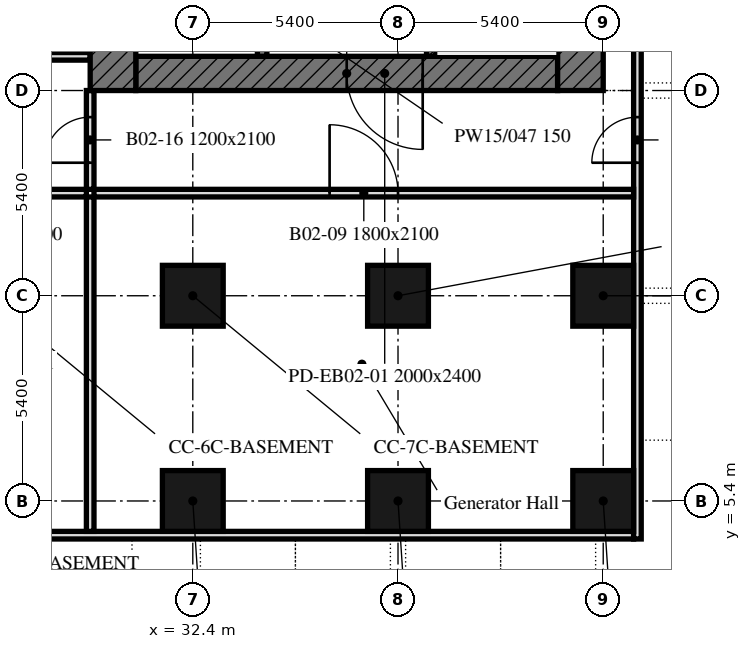
"""IFC4 building model, lengths in metres.
Left out: names, types, materials, properties, quantities, classifications, styles, units other than length and angle.
Written with IfcOpenShell. Run it as: python <this file> out.ifc"""

import sys

from ifc_helpers import new_model, si_unit, direction, frame, frame_2d, origin, origin_2d, place, context, subcontext, project, spatial, rectangle, extrude, element, fill, save


model = new_model("IFC4")
c1 = context("Model", 3, precision=1e-05, world=origin(), true_north=direction((0.0, 1.0)))
c2 = subcontext(c1, "Body", "Model", "MODEL_VIEW")
j1 = project(units=[si_unit("LENGTHUNIT", "METRE"), si_unit("PLANEANGLEUNIT", "RADIAN")], contexts=[c1])
p1 = place(None, origin())
s1 = spatial("IfcSite", under=j1, at=p1, CompositionType="ELEMENT")
p2 = place(p1, origin())
s2 = spatial("IfcBuilding", under=s1, at=p2, CompositionType="ELEMENT")
p3 = place(p2, frame((0.0, 0.0, -9.0)))
s3 = spatial("IfcBuildingStorey", under=s2, at=p3, CompositionType="ELEMENT", Elevation=-9.0)
for number, where, z_axis, x_axis in (
    (1, (32.4, 5.4, 0.0), (0.0, 0.0, 1.0), (1.0, 0.0, 0.0)),
    (2, (37.8, 5.4, 0.0), (0.0, 0.0, 1.0), (1.0, 0.0, 0.0)),
    (3, (43.2, 5.4, 0.0), (0.0, 0.0, 1.0), (1.0, 0.0, 0.0)),
    (4, (32.4, 10.8, 0.0), (0.0, 0.0, 1.0), (1.0, 0.0, 0.0)),
    (5, (37.8, 10.8, 0.0), (0.0, 0.0, 1.0), (1.0, 0.0, 0.0)),
    (6, (43.2, 10.8, 0.0), (0.0, 0.0, 1.0), (1.0, 0.0, 0.0)),
):
    element("IfcColumn", number, at=place(p3, frame(where, z_axis=z_axis, x_axis=x_axis)), inside=s3, PredefinedType="COLUMN", context=c2, shape_type="SweptSolid", body=[
        extrude(rectangle(XDim=1.6, YDim=1.6, at=origin_2d()), origin(), (0.0, 0.0, 1.0), 4.1),
    ])
p4 = place(p3, frame((4.6, 4.5, 0.0), z_axis=(0.0, 0.0, 1.0), x_axis=(1.0, 0.0, 0.0)))
e7 = element("IfcWall", 7, at=p4, inside=s3, PredefinedType="PARTITIONING", context=c2, shape_type="SweptSolid", body=[
    extrude(rectangle(XDim=39.4, YDim=0.2, at=frame_2d((19.7, 0.0))), origin(), (0.0, 0.0, 1.0), 4.1),
])
p5 = place(p4, frame((18.3, 0.0, 0.0)))
e8 = element("IfcOpeningElement", 8, at=p5, cuts=e7, PredefinedType="OPENING", context=c2, shape_type="SweptSolid", body=[
    extrude(rectangle(XDim=1.2, YDim=2.1, at=frame_2d((0.6, 1.05))), frame((0.0, 0.11, 0.0), z_axis=(0.0, -1.0, 0.0), x_axis=(1.0, 0.0, 0.0)), (0.0, 0.0, 1.0), 0.22),
])
p6 = place(p3, frame((44.1, 4.4, 0.0), z_axis=(0.0, 0.0, 1.0), x_axis=(0.0, 1.0, 0.0)))
e9 = element("IfcWall", 9, at=p6, inside=s3, PredefinedType="PARTITIONING", context=c2, shape_type="SweptSolid", body=[
    extrude(rectangle(XDim=39.8, YDim=0.2, at=frame_2d((19.9, 0.0))), origin(), (0.0, 0.0, 1.0), 4.1),
])
p7 = place(p6, frame((9.9, 0.0, 0.0)))
e10 = element("IfcOpeningElement", 10, at=p7, cuts=e9, PredefinedType="OPENING", context=c2, shape_type="SweptSolid", body=[
    extrude(rectangle(XDim=1.2, YDim=2.1, at=frame_2d((0.6, 1.05))), frame((0.0, 0.11, 0.0), z_axis=(0.0, -1.0, 0.0), x_axis=(1.0, 0.0, 0.0)), (0.0, 0.0, 1.0), 0.22),
])
p8 = place(p6, frame((28.7, 0.0, 0.0)))
e11 = element("IfcOpeningElement", 11, at=p8, cuts=e9, PredefinedType="OPENING", context=c2, shape_type="SweptSolid", body=[
    extrude(rectangle(XDim=1.2, YDim=2.1, at=frame_2d((0.6, 1.05))), frame((0.0, 0.11, 0.0), z_axis=(0.0, -1.0, 0.0), x_axis=(1.0, 0.0, 0.0)), (0.0, 0.0, 1.0), 0.22),
])
p9 = place(p3, frame((29.7, 4.6, 0.0), z_axis=(0.0, 0.0, 1.0), x_axis=(0.0, 1.0, 0.0)))
e12 = element("IfcWall", 12, at=p9, inside=s3, PredefinedType="PARTITIONING", context=c2, shape_type="SweptSolid", body=[
    extrude(rectangle(XDim=8.8, YDim=0.2, at=frame_2d((4.4, 0.0))), origin(), (0.0, 0.0, 1.0), 4.1),
])
p10 = place(p3, frame((24.4, 13.5, 0.0), z_axis=(0.0, 0.0, 1.0), x_axis=(1.0, 0.0, 0.0)))
e13 = element("IfcWall", 13, at=p10, inside=s3, PredefinedType="PARTITIONING", context=c2, shape_type="SweptSolid", body=[
    extrude(rectangle(XDim=5.2, YDim=0.2, at=frame_2d((2.6, 0.0))), origin(), (0.0, 0.0, 1.0), 4.1),
])
p11 = place(p10, frame((2.1, 0.0, 0.0)))
e14 = element("IfcOpeningElement", 14, at=p11, cuts=e13, PredefinedType="OPENING", context=c2, shape_type="SweptSolid", body=[
    extrude(rectangle(XDim=1.0, YDim=2.1, at=frame_2d((0.5, 1.05))), frame((0.0, 0.11, 0.0), z_axis=(0.0, -1.0, 0.0), x_axis=(1.0, 0.0, 0.0)), (0.0, 0.0, 1.0), 0.22),
])
p12 = place(p3, frame((29.8, 13.5, 0.0), z_axis=(0.0, 0.0, 1.0), x_axis=(1.0, 0.0, 0.0)))
e15 = element("IfcWall", 15, at=p12, inside=s3, PredefinedType="PARTITIONING", context=c2, shape_type="SweptSolid", body=[
    extrude(rectangle(XDim=14.2, YDim=0.2, at=frame_2d((7.1, 0.0))), origin(), (0.0, 0.0, 1.0), 4.1),
])
p13 = place(p12, frame((6.2, 0.0, 0.0)))
e16 = element("IfcOpeningElement", 16, at=p13, cuts=e15, PredefinedType="OPENING", context=c2, shape_type="SweptSolid", body=[
    extrude(rectangle(XDim=1.8, YDim=2.1, at=frame_2d((0.9, 1.05))), frame((0.0, 0.11, 0.0), z_axis=(0.0, -1.0, 0.0), x_axis=(1.0, 0.0, 0.0)), (0.0, 0.0, 1.0), 0.22),
])
p14 = place(p3, frame((29.7, 13.6, 0.0), z_axis=(0.0, 0.0, 1.0), x_axis=(0.0, 1.0, 0.0)))
e17 = element("IfcWall", 17, at=p14, inside=s3, PredefinedType="PARTITIONING", context=c2, shape_type="SweptSolid", body=[
    extrude(rectangle(XDim=2.6, YDim=0.2, at=frame_2d((1.3, 0.0))), origin(), (0.0, 0.0, 1.0), 4.1),
])
p15 = place(p14, frame((0.7, 0.0, 0.0)))
e18 = element("IfcOpeningElement", 18, at=p15, cuts=e17, PredefinedType="OPENING", context=c2, shape_type="SweptSolid", body=[
    extrude(rectangle(XDim=1.2, YDim=2.1, at=frame_2d((0.6, 1.05))), frame((0.0, 0.11, 0.0), z_axis=(0.0, -1.0, 0.0), x_axis=(1.0, 0.0, 0.0)), (0.0, 0.0, 1.0), 0.22),
])
p16 = place(p3, frame((18.9, 17.1, 0.0), z_axis=(0.0, 0.0, 1.0), x_axis=(1.0, 0.0, 0.0)))
e19 = element("IfcWall", 19, at=p16, inside=s3, PredefinedType="PARTITIONING", context=c2, shape_type="SweptSolid", body=[
    extrude(rectangle(XDim=10.8, YDim=0.2, at=frame_2d((5.4, 0.0))), origin(), (0.0, 0.0, 1.0), 4.1),
])
p17 = place(p16, frame((4.9, 0.0, 0.0)))
e20 = element("IfcOpeningElement", 20, at=p17, cuts=e19, PredefinedType="OPENING", context=c2, shape_type="SweptSolid", body=[
    extrude(rectangle(XDim=1.0, YDim=2.1, at=frame_2d((0.5, 1.05))), frame((0.0, 0.11, 0.0), z_axis=(0.0, -1.0, 0.0), x_axis=(1.0, 0.0, 0.0)), (0.0, 0.0, 1.0), 0.22),
])
p18 = place(p3, frame((42.0, 16.65, 0.0), z_axis=(0.0, 0.0, 1.0), x_axis=(-1.0, 0.0, 0.0)))
e21 = element("IfcWall", 21, at=p18, inside=s3, PredefinedType="SOLIDWALL", context=c2, shape_type="SweptSolid", body=[
    extrude(rectangle(XDim=11.1, YDim=0.9, at=frame_2d((5.55, 0.0))), origin(), (0.0, 0.0, 1.0), 4.1),
])
p19 = place(p18, frame((3.55, 0.0, 0.0)))
e22 = element("IfcOpeningElement", 22, at=p19, cuts=e21, PredefinedType="OPENING", context=c2, shape_type="SweptSolid", body=[
    extrude(rectangle(XDim=2.0, YDim=2.4, at=frame_2d((1.0, 1.2))), frame((0.0, 0.45, 0.0), z_axis=(0.0, -1.0, 0.0), x_axis=(1.0, 0.0, 0.0)), (0.0, 0.0, 1.0), 0.9),
])
for number, where, z_axis, x_axis in (
    (23, (42.6, 32.4, 0.0), (0.0, 0.0, 1.0), (0.0, -1.0, 0.0)),
    (24, (30.3, 16.2, 0.0), (0.0, 0.0, 1.0), (0.0, 1.0, 0.0)),
):
    element("IfcWall", number, at=place(p3, frame(where, z_axis=z_axis, x_axis=x_axis)), inside=s3, PredefinedType="SOLIDWALL", context=c2, shape_type="SweptSolid", body=[
        extrude(rectangle(XDim=16.2, YDim=1.2, at=frame_2d((8.1, 0.0))), origin(), (0.0, 0.0, 1.0), 4.1),
    ])
p20 = place(p3, frame((38.675, 17.1, 0.0), z_axis=(0.0, 0.0, 1.0), x_axis=(0.0, 1.0, 0.0)))
e25 = element("IfcWall", 25, at=p20, inside=s3, PredefinedType="SOLIDWALL", context=c2, shape_type="SweptSolid", body=[
    extrude(rectangle(XDim=14.4, YDim=0.25, at=frame_2d((7.2, 0.0))), origin(), (0.0, 0.0, 1.0), 4.1),
])
p21 = place(p20, frame((4.6, 0.0, 0.0)))
e26 = element("IfcOpeningElement", 26, at=p21, cuts=e25, PredefinedType="OPENING", context=c2, shape_type="SweptSolid", body=[
    extrude(rectangle(XDim=1.0, YDim=2.1, at=frame_2d((0.5, 1.05))), frame((0.0, 0.125, 0.0), z_axis=(0.0, -1.0, 0.0), x_axis=(1.0, 0.0, 0.0)), (0.0, 0.0, 1.0), 0.25),
])
p22 = place(p20, frame((7.062, 0.0, 0.0)))
e27 = element("IfcOpeningElement", 27, at=p22, cuts=e25, PredefinedType="OPENING", context=c2, shape_type="SweptSolid", body=[
    extrude(rectangle(XDim=1.2, YDim=2.1, at=frame_2d((0.6, 1.05))), frame((0.0, 0.125, 0.0), z_axis=(0.0, -1.0, 0.0), x_axis=(1.0, 0.0, 0.0)), (0.0, 0.0, 1.0), 0.25),
])
p23 = place(p20, frame((9.925, 0.0, 0.0)))
e28 = element("IfcOpeningElement", 28, at=p23, cuts=e25, PredefinedType="OPENING", context=c2, shape_type="SweptSolid", body=[
    extrude(rectangle(XDim=1.1, YDim=2.1, at=frame_2d((0.55, 1.05))), frame((0.0, 0.125, 0.0), z_axis=(0.0, -1.0, 0.0), x_axis=(1.0, 0.0, 0.0)), (0.0, 0.0, 1.0), 0.25),
])
p24 = place(p20, frame((12.587, 0.0, 0.0)))
e29 = element("IfcOpeningElement", 29, at=p24, cuts=e25, PredefinedType="OPENING", context=c2, shape_type="SweptSolid", body=[
    extrude(rectangle(XDim=1.1, YDim=2.1, at=frame_2d((0.55, 1.05))), frame((0.0, 0.125, 0.0), z_axis=(0.0, -1.0, 0.0), x_axis=(1.0, 0.0, 0.0)), (0.0, 0.0, 1.0), 0.25),
])
p25 = place(p3, frame((34.225, 17.1, 0.0), z_axis=(0.0, 0.0, 1.0), x_axis=(0.0, 1.0, 0.0)))
e30 = element("IfcWall", 30, at=p25, inside=s3, PredefinedType="SOLIDWALL", context=c2, shape_type="SweptSolid", body=[
    extrude(rectangle(XDim=14.4, YDim=0.25, at=frame_2d((7.2, 0.0))), origin(), (0.0, 0.0, 1.0), 4.1),
])
p26 = place(p25, frame((13.15, 0.0, 0.0)))
e31 = element("IfcOpeningElement", 31, at=p26, cuts=e30, PredefinedType="OPENING", context=c2, shape_type="SweptSolid", body=[
    extrude(rectangle(XDim=1.0, YDim=2.1, at=frame_2d((0.5, 1.05))), frame((0.0, 0.125, 0.0), z_axis=(0.0, -1.0, 0.0), x_axis=(1.0, 0.0, 0.0)), (0.0, 0.0, 1.0), 0.25),
])
p27 = place(p25, frame((0.846, 0.0, 0.0)))
e32 = element("IfcOpeningElement", 32, at=p27, cuts=e30, PredefinedType="OPENING", context=c2, shape_type="SweptSolid", body=[
    extrude(rectangle(XDim=0.9, YDim=2.1, at=frame_2d((0.45, 1.05))), frame((0.0, 0.125, 0.0), z_axis=(0.0, -1.0, 0.0), x_axis=(1.0, 0.0, 0.0)), (0.0, 0.0, 1.0), 0.25),
])
p28 = place(p25, frame((3.346, 0.0, 0.0)))
e33 = element("IfcOpeningElement", 33, at=p28, cuts=e30, PredefinedType="OPENING", context=c2, shape_type="SweptSolid", body=[
    extrude(rectangle(XDim=0.9, YDim=2.1, at=frame_2d((0.45, 1.05))), frame((0.0, 0.125, 0.0), z_axis=(0.0, -1.0, 0.0), x_axis=(1.0, 0.0, 0.0)), (0.0, 0.0, 1.0), 0.25),
])
p29 = place(p25, frame((6.175, 0.0, 0.0)))
e34 = element("IfcOpeningElement", 34, at=p29, cuts=e30, PredefinedType="OPENING", context=c2, shape_type="SweptSolid", body=[
    extrude(rectangle(XDim=0.9, YDim=2.1, at=frame_2d((0.45, 1.05))), frame((0.0, 0.125, 0.0), z_axis=(0.0, -1.0, 0.0), x_axis=(1.0, 0.0, 0.0)), (0.0, 0.0, 1.0), 0.25),
])
p30 = place(p7, origin())
e35 = element("IfcDoor", 35, at=p30, inside=s3, OperationType="SINGLE_SWING_LEFT", PredefinedType="DOOR", context=c2, shape_type="SweptSolid", body=[
    extrude(rectangle(XDim=1.2, YDim=2.1, at=frame_2d((0.6, 1.05))), frame((0.0, 0.025, 0.0), z_axis=(0.0, -1.0, 0.0), x_axis=(1.0, 0.0, 0.0)), (0.0, 0.0, 1.0), 0.05),
])
fill(e10, e35)
p31 = place(p13, origin())
e36 = element("IfcDoor", 36, at=p31, inside=s3, OperationType="DOUBLE_DOOR_SINGLE_SWING", PredefinedType="DOOR", context=c2, shape_type="SweptSolid", body=[
    extrude(rectangle(XDim=1.8, YDim=2.1, at=frame_2d((0.9, 1.05))), frame((0.0, 0.025, 0.0), z_axis=(0.0, -1.0, 0.0), x_axis=(1.0, 0.0, 0.0)), (0.0, 0.0, 1.0), 0.05),
])
fill(e16, e36)
p32 = place(p15, origin())
e37 = element("IfcDoor", 37, at=p32, inside=s3, OperationType="SINGLE_SWING_LEFT", PredefinedType="DOOR", context=c2, shape_type="SweptSolid", body=[
    extrude(rectangle(XDim=1.2, YDim=2.1, at=frame_2d((0.6, 1.05))), frame((0.0, 0.025, 0.0), z_axis=(0.0, -1.0, 0.0), x_axis=(1.0, 0.0, 0.0)), (0.0, 0.0, 1.0), 0.05),
])
fill(e18, e37)
p33 = place(p19, origin())
e38 = element("IfcDoor", 38, at=p33, inside=s3, OperationType="DOUBLE_DOOR_SINGLE_SWING", PredefinedType="DOOR", context=c2, shape_type="SweptSolid", body=[
    extrude(rectangle(XDim=2.0, YDim=2.4, at=frame_2d((1.0, 1.2))), frame((0.0, 0.025, 0.0), z_axis=(0.0, -1.0, 0.0), x_axis=(1.0, 0.0, 0.0)), (0.0, 0.0, 1.0), 0.05),
])
fill(e22, e38)
save(model, sys.argv[1])
